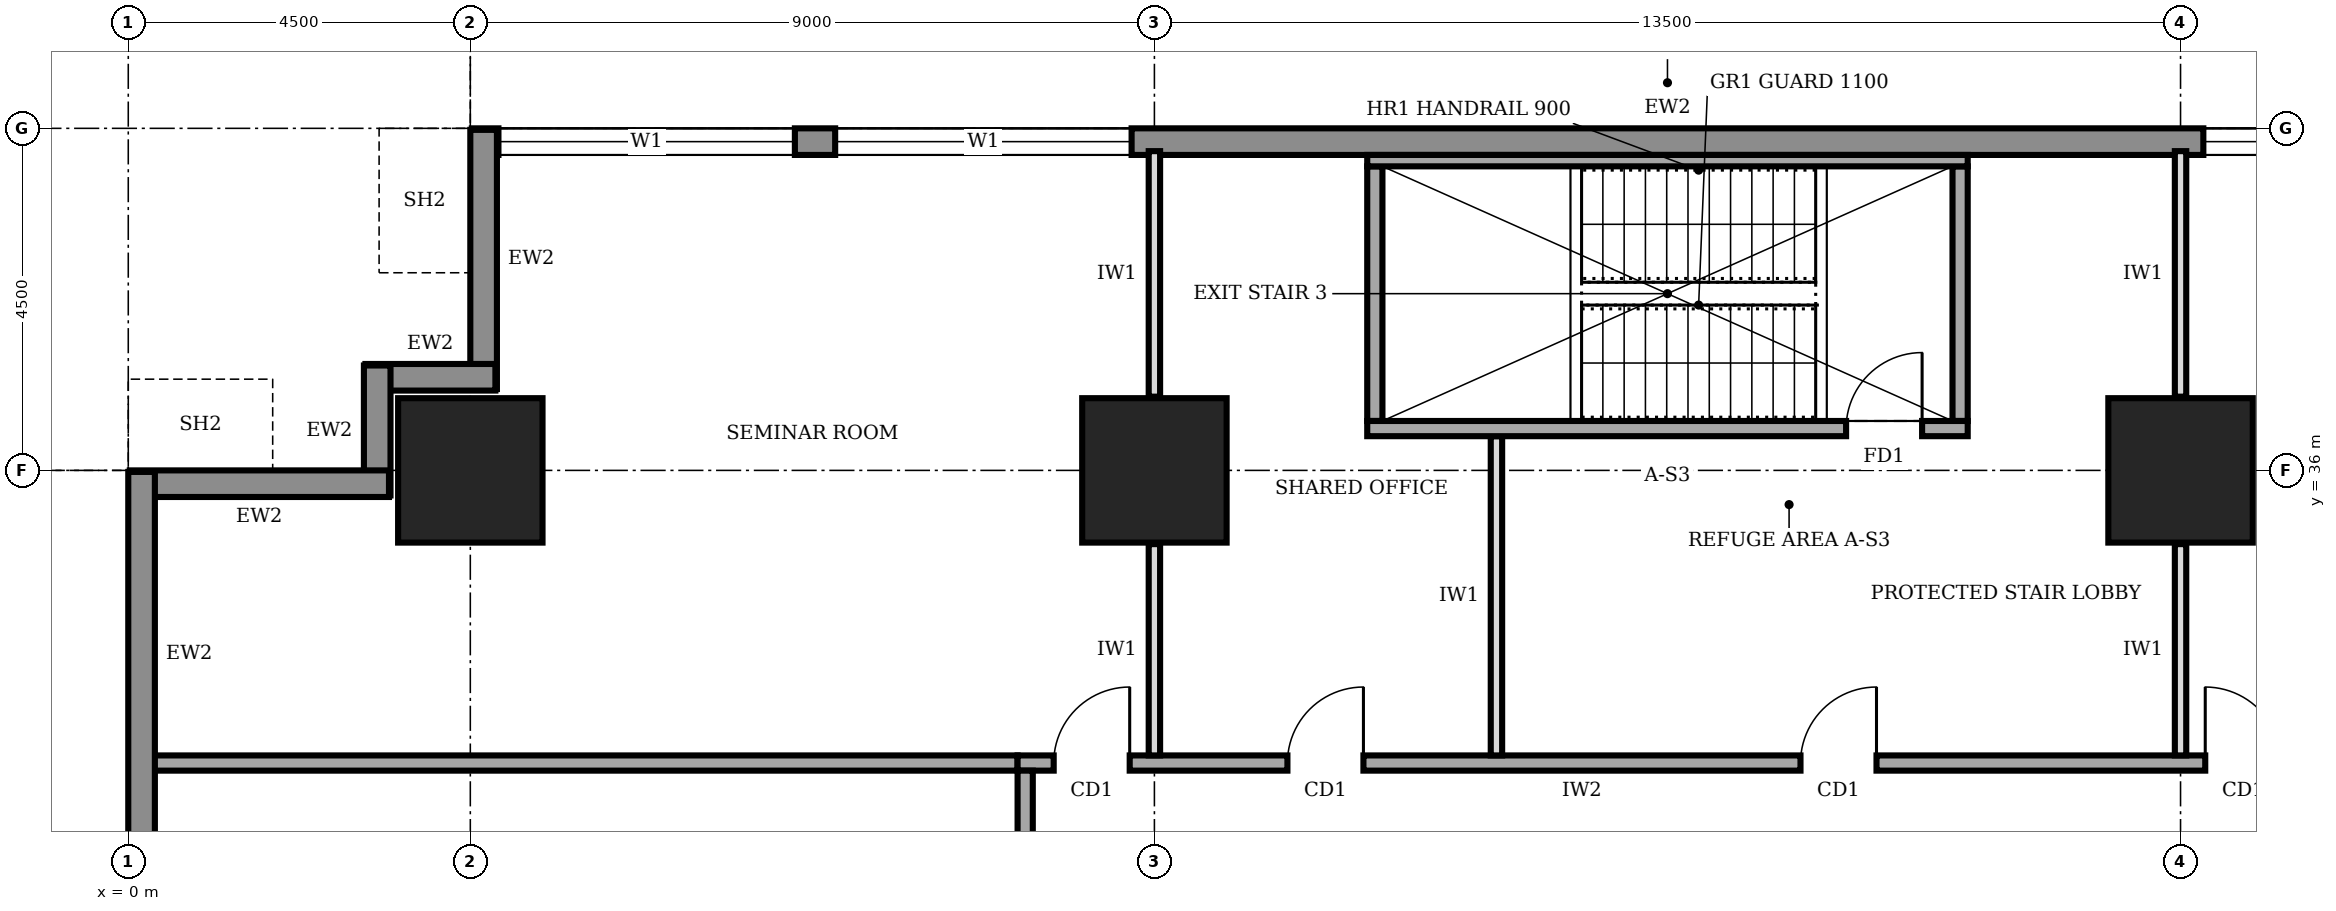
"""IFC4 building model, lengths in metres.
Left out: names, types, materials, properties, quantities, classifications, styles, units other than length and angle.
Written with IfcOpenShell. Run it as: python <this file> out.ifc"""

import sys

from ifc_helpers import new_model, si_unit, direction, frame, frame_2d, origin, origin_2d, place, context, subcontext, project, spatial, rectangle, extrude, element, fill, save


model = new_model("IFC4")
c1 = context("Model", 3, precision=1e-05, world=origin(), true_north=direction((0.0, 1.0)))
c2 = subcontext(c1, "Body", "Model", "MODEL_VIEW")
j1 = project(units=[si_unit("LENGTHUNIT", "METRE"), si_unit("PLANEANGLEUNIT", "RADIAN")], contexts=[c1])
p1 = place(None, origin())
s1 = spatial("IfcSite", under=j1, at=p1, CompositionType="ELEMENT")
p2 = place(p1, origin())
s2 = spatial("IfcBuilding", under=s1, at=p2, CompositionType="ELEMENT")
p3 = place(p2, frame((0.0, 0.0, 113.0)))
s3 = spatial("IfcBuildingStorey", under=s2, at=p3, CompositionType="ELEMENT", Elevation=113.0)
for number, where, z_axis, x_axis in (
    (1, (4.5, 36.0, 0.0), (0.0, 0.0, 1.0), (1.0, 0.0, 0.0)),
    (2, (13.5, 36.0, 0.0), (0.0, 0.0, 1.0), (1.0, 0.0, 0.0)),
    (3, (27.0, 36.0, 0.0), (0.0, 0.0, 1.0), (1.0, 0.0, 0.0)),
):
    element("IfcColumn", number, at=place(p3, frame(where, z_axis=z_axis, x_axis=x_axis)), inside=s3, PredefinedType="COLUMN", context=c2, shape_type="SweptSolid", body=[
        extrude(rectangle(XDim=1.9, YDim=1.9, at=origin_2d()), origin(), (0.0, 0.0, 1.0), 4.0),
    ])
p4 = place(p3, frame((35.98, 40.325, 0.0), z_axis=(0.0, 0.0, 1.0), x_axis=(-1.0, 0.0, 0.0)))
e4 = element("IfcWall", 4, at=p4, inside=s3, PredefinedType="STANDARD", context=c2, shape_type="SweptSolid", body=[
    extrude(rectangle(XDim=31.46, YDim=0.35, at=frame_2d((15.73, 0.0))), origin(), (0.0, 0.0, 1.0), 3.75),
])
p5 = place(p4, frame((27.21, 0.0, 0.9)))
e5 = element("IfcOpeningElement", 5, at=p5, cuts=e4, PredefinedType="OPENING", context=c2, shape_type="SweptSolid", body=[
    extrude(rectangle(XDim=3.9, YDim=2.2, at=frame_2d((1.95, 1.1))), frame((0.0, 0.185, 0.0), z_axis=(0.0, -1.0, 0.0), x_axis=(1.0, 0.0, 0.0)), (0.0, 0.0, 1.0), 0.37),
])
p6 = place(p4, frame((22.78, 0.0, 0.9)))
e6 = element("IfcOpeningElement", 6, at=p6, cuts=e4, PredefinedType="OPENING", context=c2, shape_type="SweptSolid", body=[
    extrude(rectangle(XDim=3.9, YDim=2.2, at=frame_2d((1.95, 1.1))), frame((0.0, 0.185, 0.0), z_axis=(0.0, -1.0, 0.0), x_axis=(1.0, 0.0, 0.0)), (0.0, 0.0, 1.0), 0.37),
])
p7 = place(p4, frame((4.78, 0.0, 0.9)))
e7 = element("IfcOpeningElement", 7, at=p7, cuts=e4, PredefinedType="OPENING", context=c2, shape_type="SweptSolid", body=[
    extrude(rectangle(XDim=3.9, YDim=2.2, at=frame_2d((1.95, 1.1))), frame((0.0, 0.185, 0.0), z_axis=(0.0, -1.0, 0.0), x_axis=(1.0, 0.0, 0.0)), (0.0, 0.0, 1.0), 0.37),
])
p8 = place(p3, frame((4.675, 40.48, 0.0), z_axis=(0.0, 0.0, 1.0), x_axis=(0.0, -1.0, 0.0)))
e8 = element("IfcWall", 8, at=p8, inside=s3, PredefinedType="STANDARD", context=c2, shape_type="SweptSolid", body=[
    extrude(rectangle(XDim=3.41, YDim=0.35, at=frame_2d((1.705, 0.0))), origin(), (0.0, 0.0, 1.0), 2.85),
])
for number, where, z_axis, x_axis in (
    (9, (4.83, 37.225, 0.0), (0.0, 0.0, 1.0), (-1.0, 0.0, 0.0)),
    (10, (3.275, 37.38, 0.0), (0.0, 0.0, 1.0), (0.0, -1.0, 0.0)),
):
    element("IfcWall", number, at=place(p3, frame(where, z_axis=z_axis, x_axis=x_axis)), inside=s3, PredefinedType="STANDARD", context=c2, shape_type="SweptSolid", body=[
        extrude(rectangle(XDim=1.71, YDim=0.35, at=frame_2d((0.855, 0.0))), origin(), (0.0, 0.0, 1.0), 3.75),
    ])
p9 = place(p3, frame((3.43, 35.825, 0.0), z_axis=(0.0, 0.0, 1.0), x_axis=(-1.0, 0.0, 0.0)))
e11 = element("IfcWall", 11, at=p9, inside=s3, PredefinedType="STANDARD", context=c2, shape_type="SweptSolid", body=[
    extrude(rectangle(XDim=3.41, YDim=0.35, at=frame_2d((1.705, 0.0))), origin(), (0.0, 0.0, 1.0), 2.85),
])
p10 = place(p3, frame((0.175, 35.98, 0.0), z_axis=(0.0, 0.0, 1.0), x_axis=(0.0, -1.0, 0.0)))
e12 = element("IfcWall", 12, at=p10, inside=s3, PredefinedType="STANDARD", context=c2, shape_type="SweptSolid", body=[
    extrude(rectangle(XDim=31.46, YDim=0.35, at=frame_2d((15.73, 0.0))), origin(), (0.0, 0.0, 1.0), 3.75),
])
p11 = place(p10, frame((27.21, 0.0, 0.9)))
e13 = element("IfcOpeningElement", 13, at=p11, cuts=e12, PredefinedType="OPENING", context=c2, shape_type="SweptSolid", body=[
    extrude(rectangle(XDim=3.9, YDim=2.2, at=frame_2d((1.95, 1.1))), frame((0.0, 0.185, 0.0), z_axis=(0.0, -1.0, 0.0), x_axis=(1.0, 0.0, 0.0)), (0.0, 0.0, 1.0), 0.37),
])
p12 = place(p10, frame((22.78, 0.0, 0.9)))
e14 = element("IfcOpeningElement", 14, at=p12, cuts=e12, PredefinedType="OPENING", context=c2, shape_type="SweptSolid", body=[
    extrude(rectangle(XDim=3.9, YDim=2.2, at=frame_2d((1.95, 1.1))), frame((0.0, 0.185, 0.0), z_axis=(0.0, -1.0, 0.0), x_axis=(1.0, 0.0, 0.0)), (0.0, 0.0, 1.0), 0.37),
])
p13 = place(p10, frame((18.28, 0.0, 0.9)))
e15 = element("IfcOpeningElement", 15, at=p13, cuts=e12, PredefinedType="OPENING", context=c2, shape_type="SweptSolid", body=[
    extrude(rectangle(XDim=3.9, YDim=2.2, at=frame_2d((1.95, 1.1))), frame((0.0, 0.185, 0.0), z_axis=(0.0, -1.0, 0.0), x_axis=(1.0, 0.0, 0.0)), (0.0, 0.0, 1.0), 0.37),
])
p14 = place(p10, frame((13.78, 0.0, 0.9)))
e16 = element("IfcOpeningElement", 16, at=p14, cuts=e12, PredefinedType="OPENING", context=c2, shape_type="SweptSolid", body=[
    extrude(rectangle(XDim=3.9, YDim=2.2, at=frame_2d((1.95, 1.1))), frame((0.0, 0.185, 0.0), z_axis=(0.0, -1.0, 0.0), x_axis=(1.0, 0.0, 0.0)), (0.0, 0.0, 1.0), 0.37),
])
p15 = place(p10, frame((9.28, 0.0, 0.9)))
e17 = element("IfcOpeningElement", 17, at=p15, cuts=e12, PredefinedType="OPENING", context=c2, shape_type="SweptSolid", body=[
    extrude(rectangle(XDim=3.9, YDim=2.2, at=frame_2d((1.95, 1.1))), frame((0.0, 0.185, 0.0), z_axis=(0.0, -1.0, 0.0), x_axis=(1.0, 0.0, 0.0)), (0.0, 0.0, 1.0), 0.37),
])
p16 = place(p10, frame((4.78, 0.0, 0.9)))
e18 = element("IfcOpeningElement", 18, at=p16, cuts=e12, PredefinedType="OPENING", context=c2, shape_type="SweptSolid", body=[
    extrude(rectangle(XDim=3.9, YDim=2.2, at=frame_2d((1.95, 1.1))), frame((0.0, 0.185, 0.0), z_axis=(0.0, -1.0, 0.0), x_axis=(1.0, 0.0, 0.0)), (0.0, 0.0, 1.0), 0.37),
])
p17 = place(p3, frame((28.6, 32.15, 0.0), z_axis=(0.0, 0.0, 1.0), x_axis=(-1.0, 0.0, 0.0)))
e19 = element("IfcWall", 19, at=p17, inside=s3, PredefinedType="SOLIDWALL", context=c2, shape_type="SweptSolid", body=[
    extrude(rectangle(XDim=16.9, YDim=0.2, at=frame_2d((8.45, 0.0))), origin(), (0.0, 0.0, 1.0), 3.75),
])
p18 = place(p17, frame((15.425, 0.0, 0.0)))
e20 = element("IfcOpeningElement", 20, at=p18, cuts=e19, PredefinedType="OPENING", context=c2, shape_type="SweptSolid", body=[
    extrude(rectangle(XDim=1.0, YDim=2.1, at=frame_2d((0.5, 1.05))), frame((0.0, 0.11, 0.0), z_axis=(0.0, -1.0, 0.0), x_axis=(1.0, 0.0, 0.0)), (0.0, 0.0, 1.0), 0.22),
])
p19 = place(p17, frame((12.35, 0.0, 0.0)))
e21 = element("IfcOpeningElement", 21, at=p19, cuts=e19, PredefinedType="OPENING", context=c2, shape_type="SweptSolid", body=[
    extrude(rectangle(XDim=1.0, YDim=2.1, at=frame_2d((0.5, 1.05))), frame((0.0, 0.11, 0.0), z_axis=(0.0, -1.0, 0.0), x_axis=(1.0, 0.0, 0.0)), (0.0, 0.0, 1.0), 0.22),
])
p20 = place(p17, frame((5.6, 0.0, 0.0)))
e22 = element("IfcOpeningElement", 22, at=p20, cuts=e19, PredefinedType="OPENING", context=c2, shape_type="SweptSolid", body=[
    extrude(rectangle(XDim=1.0, YDim=2.1, at=frame_2d((0.5, 1.05))), frame((0.0, 0.11, 0.0), z_axis=(0.0, -1.0, 0.0), x_axis=(1.0, 0.0, 0.0)), (0.0, 0.0, 1.0), 0.22),
])
p21 = place(p17, frame((0.275, 0.0, 0.0)))
e23 = element("IfcOpeningElement", 23, at=p21, cuts=e19, PredefinedType="OPENING", context=c2, shape_type="SweptSolid", body=[
    extrude(rectangle(XDim=1.0, YDim=2.1, at=frame_2d((0.5, 1.05))), frame((0.0, 0.11, 0.0), z_axis=(0.0, -1.0, 0.0), x_axis=(1.0, 0.0, 0.0)), (0.0, 0.0, 1.0), 0.22),
])
p22 = place(p3, frame((11.8, 32.05, 0.0), z_axis=(0.0, 0.0, 1.0), x_axis=(0.0, -1.0, 0.0)))
e24 = element("IfcWall", 24, at=p22, inside=s3, PredefinedType="SOLIDWALL", context=c2, shape_type="SweptSolid", body=[
    extrude(rectangle(XDim=23.8, YDim=0.2, at=frame_2d((11.9, 0.0))), origin(), (0.0, 0.0, 1.0), 3.75),
])
p23 = place(p22, frame((20.675, 0.0, 0.0)))
e25 = element("IfcOpeningElement", 25, at=p23, cuts=e24, PredefinedType="OPENING", context=c2, shape_type="SweptSolid", body=[
    extrude(rectangle(XDim=1.0, YDim=2.1, at=frame_2d((0.5, 1.05))), frame((0.0, 0.11, 0.0), z_axis=(0.0, -1.0, 0.0), x_axis=(1.0, 0.0, 0.0)), (0.0, 0.0, 1.0), 0.22),
])
p24 = place(p22, frame((16.9, 0.0, 0.0)))
e26 = element("IfcOpeningElement", 26, at=p24, cuts=e24, PredefinedType="OPENING", context=c2, shape_type="SweptSolid", body=[
    extrude(rectangle(XDim=0.9, YDim=2.1, at=frame_2d((0.45, 1.05))), frame((0.0, 0.11, 0.0), z_axis=(0.0, -1.0, 0.0), x_axis=(1.0, 0.0, 0.0)), (0.0, 0.0, 1.0), 0.22),
])
p25 = place(p22, frame((13.7, 0.0, 0.0)))
e27 = element("IfcOpeningElement", 27, at=p25, cuts=e24, PredefinedType="OPENING", context=c2, shape_type="SweptSolid", body=[
    extrude(rectangle(XDim=0.9, YDim=2.1, at=frame_2d((0.45, 1.05))), frame((0.0, 0.11, 0.0), z_axis=(0.0, -1.0, 0.0), x_axis=(1.0, 0.0, 0.0)), (0.0, 0.0, 1.0), 0.22),
])
p26 = place(p22, frame((8.15, 0.0, 0.0)))
e28 = element("IfcOpeningElement", 28, at=p26, cuts=e24, PredefinedType="OPENING", context=c2, shape_type="SweptSolid", body=[
    extrude(rectangle(XDim=0.9, YDim=2.1, at=frame_2d((0.45, 1.05))), frame((0.0, 0.11, 0.0), z_axis=(0.0, -1.0, 0.0), x_axis=(1.0, 0.0, 0.0)), (0.0, 0.0, 1.0), 0.22),
])
p27 = place(p22, frame((5.55, 0.0, 0.0)))
e29 = element("IfcOpeningElement", 29, at=p27, cuts=e24, PredefinedType="OPENING", context=c2, shape_type="SweptSolid", body=[
    extrude(rectangle(XDim=1.0, YDim=2.1, at=frame_2d((0.5, 1.05))), frame((0.0, 0.11, 0.0), z_axis=(0.0, -1.0, 0.0), x_axis=(1.0, 0.0, 0.0)), (0.0, 0.0, 1.0), 0.22),
])
p28 = place(p22, frame((10.65, 0.0, 0.0)))
e30 = element("IfcOpeningElement", 30, at=p28, cuts=e24, PredefinedType="OPENING", context=c2, shape_type="SweptSolid", body=[
    extrude(rectangle(XDim=1.0, YDim=2.1, at=frame_2d((0.5, 1.05))), frame((0.0, 0.11, 0.0), z_axis=(0.0, -1.0, 0.0), x_axis=(1.0, 0.0, 0.0)), (0.0, 0.0, 1.0), 0.22),
])
p29 = place(p22, frame((1.925, 0.0, 0.0)))
e31 = element("IfcOpeningElement", 31, at=p29, cuts=e24, PredefinedType="OPENING", context=c2, shape_type="SweptSolid", body=[
    extrude(rectangle(XDim=1.0, YDim=2.1, at=frame_2d((0.5, 1.05))), frame((0.0, 0.11, 0.0), z_axis=(0.0, -1.0, 0.0), x_axis=(1.0, 0.0, 0.0)), (0.0, 0.0, 1.0), 0.22),
])
p30 = place(p3, frame((0.3, 32.15, 0.0), z_axis=(0.0, 0.0, 1.0), x_axis=(1.0, 0.0, 0.0)))
e32 = element("IfcWall", 32, at=p30, inside=s3, PredefinedType="SOLIDWALL", context=c2, shape_type="SweptSolid", body=[
    extrude(rectangle(XDim=11.4, YDim=0.2, at=frame_2d((5.7, 0.0))), origin(), (0.0, 0.0, 1.0), 3.75),
])
p31 = place(p3, frame((13.5, 32.25, 0.0), z_axis=(0.0, 0.0, 1.0), x_axis=(0.0, 1.0, 0.0)))
e33 = element("IfcWall", 33, at=p31, inside=s3, PredefinedType="PARTITIONING", context=c2, shape_type="SweptSolid", body=[
    extrude(rectangle(XDim=2.78, YDim=0.15, at=frame_2d((1.39, 0.0))), origin(), (0.0, 0.0, 1.0), 2.85),
])
p32 = place(p3, frame((13.5, 36.97, 0.0), z_axis=(0.0, 0.0, 1.0), x_axis=(0.0, 1.0, 0.0)))
e34 = element("IfcWall", 34, at=p32, inside=s3, PredefinedType="PARTITIONING", context=c2, shape_type="SweptSolid", body=[
    extrude(rectangle(XDim=3.23, YDim=0.15, at=frame_2d((1.615, 0.0))), origin(), (0.0, 0.0, 1.0), 2.85),
])
p33 = place(p3, frame((18.0, 32.25, 0.0), z_axis=(0.0, 0.0, 1.0), x_axis=(0.0, 1.0, 0.0)))
e35 = element("IfcWall", 35, at=p33, inside=s3, PredefinedType="PARTITIONING", context=c2, shape_type="SweptSolid", body=[
    extrude(rectangle(XDim=4.2, YDim=0.15, at=frame_2d((2.1, 0.0))), origin(), (0.0, 0.0, 1.0), 3.75),
])
p34 = place(p3, frame((27.0, 32.25, 0.0), z_axis=(0.0, 0.0, 1.0), x_axis=(0.0, 1.0, 0.0)))
e36 = element("IfcWall", 36, at=p34, inside=s3, PredefinedType="PARTITIONING", context=c2, shape_type="SweptSolid", body=[
    extrude(rectangle(XDim=2.78, YDim=0.15, at=frame_2d((1.39, 0.0))), origin(), (0.0, 0.0, 1.0), 2.85),
])
p35 = place(p3, frame((27.0, 36.97, 0.0), z_axis=(0.0, 0.0, 1.0), x_axis=(0.0, 1.0, 0.0)))
e37 = element("IfcWall", 37, at=p35, inside=s3, PredefinedType="PARTITIONING", context=c2, shape_type="SweptSolid", body=[
    extrude(rectangle(XDim=3.23, YDim=0.15, at=frame_2d((1.615, 0.0))), origin(), (0.0, 0.0, 1.0), 2.85),
])
p36 = place(p3, frame((16.3, 36.55, 0.0), z_axis=(0.0, 0.0, 1.0), x_axis=(1.0, 0.0, 0.0)))
e38 = element("IfcWall", 38, at=p36, inside=s3, PredefinedType="SOLIDWALL", context=c2, shape_type="SweptSolid", body=[
    extrude(rectangle(XDim=7.9, YDim=0.2, at=frame_2d((3.95, 0.0))), origin(), (0.0, 0.0, 1.0), 3.75),
])
p37 = place(p36, frame((6.3, 0.0, 0.0)))
e39 = element("IfcOpeningElement", 39, at=p37, cuts=e38, PredefinedType="OPENING", context=c2, shape_type="SweptSolid", body=[
    extrude(rectangle(XDim=1.0, YDim=2.1, at=frame_2d((0.5, 1.05))), frame((0.0, 0.11, 0.0), z_axis=(0.0, -1.0, 0.0), x_axis=(1.0, 0.0, 0.0)), (0.0, 0.0, 1.0), 0.22),
])
p38 = place(p3, frame((16.3, 40.075, 0.0), z_axis=(0.0, 0.0, 1.0), x_axis=(1.0, 0.0, 0.0)))
e40 = element("IfcWall", 40, at=p38, inside=s3, PredefinedType="SOLIDWALL", context=c2, shape_type="SweptSolid", body=[
    extrude(rectangle(XDim=7.9, YDim=0.15, at=frame_2d((3.95, 0.0))), origin(), (0.0, 0.0, 1.0), 3.75),
])
for number, where, z_axis, x_axis in (
    (41, (16.4, 36.65, 0.0), (0.0, 0.0, 1.0), (0.0, 1.0, 0.0)),
    (42, (24.1, 36.65, 0.0), (0.0, 0.0, 1.0), (0.0, 1.0, 0.0)),
):
    element("IfcWall", number, at=place(p3, frame(where, z_axis=z_axis, x_axis=x_axis)), inside=s3, PredefinedType="SOLIDWALL", context=c2, shape_type="SweptSolid", body=[
        extrude(rectangle(XDim=3.35, YDim=0.2, at=frame_2d((1.675, 0.0))), origin(), (0.0, 0.0, 1.0), 3.75),
    ])
p39 = place(p5, origin())
e43 = element("IfcWindow", 43, at=p39, inside=s3, PartitioningType="SINGLE_PANEL", PredefinedType="WINDOW", context=c2, shape_type="SweptSolid", body=[
    extrude(rectangle(XDim=3.9, YDim=2.2, at=frame_2d((1.95, 1.1))), frame((0.0, 0.03, 0.0), z_axis=(0.0, -1.0, 0.0), x_axis=(1.0, 0.0, 0.0)), (0.0, 0.0, 1.0), 0.06),
])
fill(e5, e43)
p40 = place(p6, origin())
e44 = element("IfcWindow", 44, at=p40, inside=s3, PartitioningType="SINGLE_PANEL", PredefinedType="WINDOW", context=c2, shape_type="SweptSolid", body=[
    extrude(rectangle(XDim=3.9, YDim=2.2, at=frame_2d((1.95, 1.1))), frame((0.0, 0.03, 0.0), z_axis=(0.0, -1.0, 0.0), x_axis=(1.0, 0.0, 0.0)), (0.0, 0.0, 1.0), 0.06),
])
fill(e6, e44)
p41 = place(p7, origin())
e45 = element("IfcWindow", 45, at=p41, inside=s3, PartitioningType="SINGLE_PANEL", PredefinedType="WINDOW", context=c2, shape_type="SweptSolid", body=[
    extrude(rectangle(XDim=3.9, YDim=2.2, at=frame_2d((1.95, 1.1))), frame((0.0, 0.03, 0.0), z_axis=(0.0, -1.0, 0.0), x_axis=(1.0, 0.0, 0.0)), (0.0, 0.0, 1.0), 0.06),
])
fill(e7, e45)
p42 = place(p18, frame((1.0, 0.0, 0.0), z_axis=(0.0, 0.0, 1.0), x_axis=(-1.0, 0.0, 0.0)))
e46 = element("IfcDoor", 46, at=p42, inside=s3, OperationType="SINGLE_SWING_RIGHT", PredefinedType="DOOR", context=c2, shape_type="SweptSolid", body=[
    extrude(rectangle(XDim=1.0, YDim=2.1, at=frame_2d((0.5, 1.05))), frame((0.0, 0.025, 0.0), z_axis=(0.0, -1.0, 0.0), x_axis=(1.0, 0.0, 0.0)), (0.0, 0.0, 1.0), 0.05),
])
fill(e20, e46)
p43 = place(p19, frame((1.0, 0.0, 0.0), z_axis=(0.0, 0.0, 1.0), x_axis=(-1.0, 0.0, 0.0)))
e47 = element("IfcDoor", 47, at=p43, inside=s3, OperationType="SINGLE_SWING_RIGHT", PredefinedType="DOOR", context=c2, shape_type="SweptSolid", body=[
    extrude(rectangle(XDim=1.0, YDim=2.1, at=frame_2d((0.5, 1.05))), frame((0.0, 0.025, 0.0), z_axis=(0.0, -1.0, 0.0), x_axis=(1.0, 0.0, 0.0)), (0.0, 0.0, 1.0), 0.05),
])
fill(e21, e47)
p44 = place(p20, frame((1.0, 0.0, 0.0), z_axis=(0.0, 0.0, 1.0), x_axis=(-1.0, 0.0, 0.0)))
e48 = element("IfcDoor", 48, at=p44, inside=s3, OperationType="SINGLE_SWING_RIGHT", PredefinedType="DOOR", context=c2, shape_type="SweptSolid", body=[
    extrude(rectangle(XDim=1.0, YDim=2.1, at=frame_2d((0.5, 1.05))), frame((0.0, 0.025, 0.0), z_axis=(0.0, -1.0, 0.0), x_axis=(1.0, 0.0, 0.0)), (0.0, 0.0, 1.0), 0.05),
])
fill(e22, e48)
p45 = place(p21, frame((1.0, 0.0, 0.0), z_axis=(0.0, 0.0, 1.0), x_axis=(-1.0, 0.0, 0.0)))
e49 = element("IfcDoor", 49, at=p45, inside=s3, OperationType="SINGLE_SWING_LEFT", PredefinedType="DOOR", context=c2, shape_type="SweptSolid", body=[
    extrude(rectangle(XDim=1.0, YDim=2.1, at=frame_2d((0.5, 1.05))), frame((0.0, 0.025, 0.0), z_axis=(0.0, -1.0, 0.0), x_axis=(1.0, 0.0, 0.0)), (0.0, 0.0, 1.0), 0.05),
])
fill(e23, e49)
p46 = place(p37, origin())
e50 = element("IfcDoor", 50, at=p46, inside=s3, OperationType="SINGLE_SWING_RIGHT", PredefinedType="DOOR", context=c2, shape_type="SweptSolid", body=[
    extrude(rectangle(XDim=1.0, YDim=2.1, at=frame_2d((0.5, 1.05))), frame((0.0, 0.025, 0.0), z_axis=(0.0, -1.0, 0.0), x_axis=(1.0, 0.0, 0.0)), (0.0, 0.0, 1.0), 0.05),
])
fill(e39, e50)
save(model, sys.argv[1])
